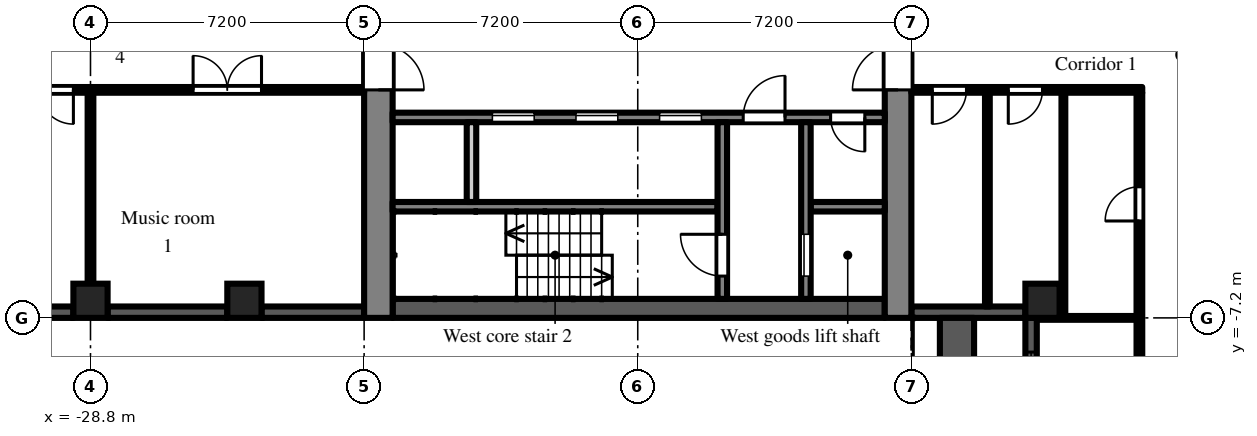
"""IFC4 building model, lengths in metres.
Left out: names, types, materials, properties, quantities, classifications, styles, units other than length and angle.
Written with IfcOpenShell. Run it as: python <this file> out.ifc"""

import sys

from ifc_helpers import new_model, si_unit, direction, frame, frame_2d, origin, origin_2d, place, context, subcontext, project, spatial, rectangle, extrude, element, fill, save


model = new_model("IFC4")
c1 = context("Model", 3, precision=1e-05, world=origin(), true_north=direction((0.0, 1.0)))
c2 = subcontext(c1, "Body", "Model", "MODEL_VIEW")
j1 = project(units=[si_unit("LENGTHUNIT", "METRE"), si_unit("PLANEANGLEUNIT", "RADIAN")], contexts=[c1])
p1 = place(None, origin())
s1 = spatial("IfcSite", under=j1, at=p1, CompositionType="ELEMENT")
p2 = place(p1, origin())
s2 = spatial("IfcBuilding", under=s1, at=p2, CompositionType="ELEMENT")
p3 = place(p2, frame((0.0, 0.0, 108.9)))
s3 = spatial("IfcBuildingStorey", under=s2, at=p3, CompositionType="ELEMENT", Elevation=108.9)
for number, where, z_axis, x_axis in (
    (1, (-28.8, -6.75, 0.0), (0.0, 0.0, 1.0), (1.0, 0.0, 0.0)),
    (2, (-24.75, -6.75, 0.0), (0.0, 0.0, 1.0), (1.0, 0.0, 0.0)),
    (3, (-3.75, -6.75, 0.0), (0.0, 0.0, 1.0), (1.0, 0.0, 0.0)),
):
    element("IfcColumn", number, at=place(p3, frame(where, z_axis=z_axis, x_axis=x_axis)), inside=s3, PredefinedType="COLUMN", context=c2, shape_type="SweptSolid", body=[
        extrude(rectangle(XDim=0.9, YDim=0.9, at=origin_2d()), origin(), (0.0, 0.0, 1.0), 3.0),
    ])
p4 = place(p3, frame((-35.55, -7.05, 0.0), z_axis=(0.0, 0.0, 1.0), x_axis=(1.0, 0.0, 0.0)))
e4 = element("IfcWall", 4, at=p4, inside=s3, PredefinedType="SOLIDWALL", context=c2, shape_type="SweptSolid", body=[
    extrude(rectangle(XDim=6.3, YDim=0.3, at=frame_2d((3.15, 0.0))), origin(), (0.0, 0.0, 1.0), 2.2),
])
p5 = place(p3, frame((-28.35, -7.05, 0.0), z_axis=(0.0, 0.0, 1.0), x_axis=(1.0, 0.0, 0.0)))
e5 = element("IfcWall", 5, at=p5, inside=s3, PredefinedType="SOLIDWALL", context=c2, shape_type="SweptSolid", body=[
    extrude(rectangle(XDim=3.15, YDim=0.3, at=frame_2d((1.575, 0.0))), origin(), (0.0, 0.0, 1.0), 2.2),
])
p6 = place(p3, frame((-24.3, -7.05, 0.0), z_axis=(0.0, 0.0, 1.0), x_axis=(1.0, 0.0, 0.0)))
e6 = element("IfcWall", 6, at=p6, inside=s3, PredefinedType="SOLIDWALL", context=c2, shape_type="SweptSolid", body=[
    extrude(rectangle(XDim=2.7, YDim=0.3, at=frame_2d((1.35, 0.0))), origin(), (0.0, 0.0, 1.0), 2.2),
])
p7 = place(p3, frame((-7.2, -7.05, 0.0), z_axis=(0.0, 0.0, 1.0), x_axis=(1.0, 0.0, 0.0)))
e7 = element("IfcWall", 7, at=p7, inside=s3, PredefinedType="SOLIDWALL", context=c2, shape_type="SweptSolid", body=[
    extrude(rectangle(XDim=3.0, YDim=0.3, at=frame_2d((1.5, 0.0))), origin(), (0.0, 0.0, 1.0), 2.55),
])
p8 = place(p3, frame((-4.05, -7.2, 0.0), z_axis=(0.0, 0.0, 1.0), x_axis=(0.0, -1.0, 0.0)))
e8 = element("IfcWall", 8, at=p8, inside=s3, PredefinedType="SOLIDWALL", context=c2, shape_type="SweptSolid", body=[
    extrude(rectangle(XDim=7.2, YDim=0.3, at=frame_2d((3.6, 0.0))), origin(), (0.0, 0.0, 1.0), 2.55),
])
p9 = place(p8, frame((3.0, 0.0, 0.0)))
e9 = element("IfcOpeningElement", 9, at=p9, cuts=e8, PredefinedType="OPENING", context=c2, shape_type="SweptSolid", body=[
    extrude(rectangle(XDim=1.2, YDim=2.05, at=frame_2d((0.6, 1.025))), frame((0.0, 0.16, 0.0), z_axis=(0.0, -1.0, 0.0), x_axis=(1.0, 0.0, 0.0)), (0.0, 0.0, 1.0), 0.32),
])
p10 = place(p8, frame((0.9, 0.0, 0.2)))
e10 = element("IfcOpeningElement", 10, at=p10, cuts=e8, PredefinedType="OPENING", context=c2, shape_type="SweptSolid", body=[
    extrude(rectangle(XDim=1.8, YDim=1.85, at=frame_2d((0.9, 0.925))), frame((0.0, 0.16, 0.0), z_axis=(0.0, -1.0, 0.0), x_axis=(1.0, 0.0, 0.0)), (0.0, 0.0, 1.0), 0.32),
])
p11 = place(p8, frame((4.5, 0.0, 0.2)))
e11 = element("IfcOpeningElement", 11, at=p11, cuts=e8, PredefinedType="OPENING", context=c2, shape_type="SweptSolid", body=[
    extrude(rectangle(XDim=1.8, YDim=1.85, at=frame_2d((0.9, 0.925))), frame((0.0, 0.16, 0.0), z_axis=(0.0, -1.0, 0.0), x_axis=(1.0, 0.0, 0.0)), (0.0, 0.0, 1.0), 0.32),
])
p12 = place(p3, frame((-6.0, -14.4, 0.0), z_axis=(0.0, 0.0, 1.0), x_axis=(0.0, 1.0, 0.0)))
e12 = element("IfcWall", 12, at=p12, inside=s3, PredefinedType="PARAPET", context=c2, shape_type="SweptSolid", body=[
    extrude(rectangle(XDim=7.2, YDim=0.9, at=frame_2d((3.6, 0.0))), origin(), (0.0, 0.0, 1.0), 0.8),
])
p13 = place(p3, frame((-7.55, -7.2, 0.0), z_axis=(0.0, 0.0, 1.0), x_axis=(0.0, 1.0, 0.0)))
e13 = element("IfcWall", 13, at=p13, inside=s3, PredefinedType="SHEAR", context=c2, shape_type="SweptSolid", body=[
    extrude(rectangle(XDim=14.4, YDim=0.7, at=frame_2d((7.2, 0.0))), origin(), (0.0, 0.0, 1.0), 2.55),
])
p14 = place(p13, frame((6.0, 0.0, 0.0)))
e14 = element("IfcOpeningElement", 14, at=p14, cuts=e13, PredefinedType="OPENING", context=c2, shape_type="SweptSolid", body=[
    extrude(rectangle(XDim=2.4, YDim=2.2, at=frame_2d((1.2, 1.1))), frame((0.0, 0.36, 0.0), z_axis=(0.0, -1.0, 0.0), x_axis=(1.0, 0.0, 0.0)), (0.0, 0.0, 1.0), 0.72),
])
p15 = place(p3, frame((-21.225, -7.2, 0.0), z_axis=(0.0, 0.0, 1.0), x_axis=(0.0, 1.0, 0.0)))
e15 = element("IfcWall", 15, at=p15, inside=s3, PredefinedType="SHEAR", context=c2, shape_type="SweptSolid", body=[
    extrude(rectangle(XDim=14.4, YDim=0.75, at=frame_2d((7.2, 0.0))), origin(), (0.0, 0.0, 1.0), 2.55),
])
p16 = place(p15, frame((6.0, 0.0, 0.0)))
e16 = element("IfcOpeningElement", 16, at=p16, cuts=e15, PredefinedType="OPENING", context=c2, shape_type="SweptSolid", body=[
    extrude(rectangle(XDim=2.4, YDim=2.2, at=frame_2d((1.2, 1.1))), frame((0.0, 0.385, 0.0), z_axis=(0.0, -1.0, 0.0), x_axis=(1.0, 0.0, 0.0)), (0.0, 0.0, 1.0), 0.77),
])
p17 = place(p3, frame((-7.9, -6.95, 0.0), z_axis=(0.0, 0.0, 1.0), x_axis=(-1.0, 0.0, 0.0)))
e17 = element("IfcWall", 17, at=p17, inside=s3, PredefinedType="SHEAR", context=c2, shape_type="SweptSolid", body=[
    extrude(rectangle(XDim=12.95, YDim=0.5, at=frame_2d((6.475, 0.0))), origin(), (0.0, 0.0, 1.0), 2.55),
])
p18 = place(p3, frame((-7.9, -1.925, 0.0), z_axis=(0.0, 0.0, 1.0), x_axis=(-1.0, 0.0, 0.0)))
e18 = element("IfcWall", 18, at=p18, inside=s3, PredefinedType="SHEAR", context=c2, shape_type="SweptSolid", body=[
    extrude(rectangle(XDim=12.95, YDim=0.25, at=frame_2d((6.475, 0.0))), origin(), (0.0, 0.0, 1.0), 2.55),
])
p19 = place(p18, frame((4.825, 0.0, 0.0)))
e19 = element("IfcOpeningElement", 19, at=p19, cuts=e18, PredefinedType="OPENING", context=c2, shape_type="SweptSolid", body=[
    extrude(rectangle(XDim=1.1, YDim=2.1, at=frame_2d((0.55, 1.05))), frame((0.0, 0.135, 0.0), z_axis=(0.0, -1.0, 0.0), x_axis=(1.0, 0.0, 0.0)), (0.0, 0.0, 1.0), 0.27),
])
p20 = place(p18, frame((7.025, 0.0, 0.0)))
e20 = element("IfcOpeningElement", 20, at=p20, cuts=e18, PredefinedType="OPENING", context=c2, shape_type="SweptSolid", body=[
    extrude(rectangle(XDim=1.1, YDim=2.1, at=frame_2d((0.55, 1.05))), frame((0.0, 0.135, 0.0), z_axis=(0.0, -1.0, 0.0), x_axis=(1.0, 0.0, 0.0)), (0.0, 0.0, 1.0), 0.27),
])
p21 = place(p18, frame((9.225, 0.0, 0.0)))
e21 = element("IfcOpeningElement", 21, at=p21, cuts=e18, PredefinedType="OPENING", context=c2, shape_type="SweptSolid", body=[
    extrude(rectangle(XDim=1.1, YDim=2.1, at=frame_2d((0.55, 1.05))), frame((0.0, 0.135, 0.0), z_axis=(0.0, -1.0, 0.0), x_axis=(1.0, 0.0, 0.0)), (0.0, 0.0, 1.0), 0.27),
])
p22 = place(p18, frame((0.525, 0.0, 0.0)))
e22 = element("IfcOpeningElement", 22, at=p22, cuts=e18, PredefinedType="OPENING", context=c2, shape_type="SweptSolid", body=[
    extrude(rectangle(XDim=0.9, YDim=2.1, at=frame_2d((0.45, 1.05))), frame((0.0, 0.135, 0.0), z_axis=(0.0, -1.0, 0.0), x_axis=(1.0, 0.0, 0.0)), (0.0, 0.0, 1.0), 0.27),
])
p23 = place(p18, frame((2.625, 0.0, 0.0)))
e23 = element("IfcOpeningElement", 23, at=p23, cuts=e18, PredefinedType="OPENING", context=c2, shape_type="SweptSolid", body=[
    extrude(rectangle(XDim=1.1, YDim=2.1, at=frame_2d((0.55, 1.05))), frame((0.0, 0.135, 0.0), z_axis=(0.0, -1.0, 0.0), x_axis=(1.0, 0.0, 0.0)), (0.0, 0.0, 1.0), 0.27),
])
p24 = place(p3, frame((-7.9, -4.275, 0.0), z_axis=(0.0, 0.0, 1.0), x_axis=(-1.0, 0.0, 0.0)))
e24 = element("IfcWall", 24, at=p24, inside=s3, PredefinedType="SHEAR", context=c2, shape_type="SweptSolid", body=[
    extrude(rectangle(XDim=1.95, YDim=0.25, at=frame_2d((0.975, 0.0))), origin(), (0.0, 0.0, 1.0), 2.55),
])
p25 = place(p3, frame((-12.3, -4.275, 0.0), z_axis=(0.0, 0.0, 1.0), x_axis=(-1.0, 0.0, 0.0)))
e25 = element("IfcWall", 25, at=p25, inside=s3, PredefinedType="SHEAR", context=c2, shape_type="SweptSolid", body=[
    extrude(rectangle(XDim=8.55, YDim=0.25, at=frame_2d((4.275, 0.0))), origin(), (0.0, 0.0, 1.0), 2.55),
])
p26 = place(p3, frame((-9.975, -2.05, 0.0), z_axis=(0.0, 0.0, 1.0), x_axis=(0.0, -1.0, 0.0)))
e26 = element("IfcWall", 26, at=p26, inside=s3, PredefinedType="SHEAR", context=c2, shape_type="SweptSolid", body=[
    extrude(rectangle(XDim=4.65, YDim=0.25, at=frame_2d((2.325, 0.0))), origin(), (0.0, 0.0, 1.0), 2.55),
])
p27 = place(p26, frame((2.95, 0.0, 0.0)))
e27 = element("IfcOpeningElement", 27, at=p27, cuts=e26, PredefinedType="OPENING", context=c2, shape_type="SweptSolid", body=[
    extrude(rectangle(XDim=1.1, YDim=2.1, at=frame_2d((0.55, 1.05))), frame((0.0, 0.135, 0.0), z_axis=(0.0, -1.0, 0.0), x_axis=(1.0, 0.0, 0.0)), (0.0, 0.0, 1.0), 0.27),
])
p28 = place(p3, frame((-12.175, -2.05, 0.0), z_axis=(0.0, 0.0, 1.0), x_axis=(0.0, -1.0, 0.0)))
e28 = element("IfcWall", 28, at=p28, inside=s3, PredefinedType="SHEAR", context=c2, shape_type="SweptSolid", body=[
    extrude(rectangle(XDim=4.65, YDim=0.25, at=frame_2d((2.325, 0.0))), origin(), (0.0, 0.0, 1.0), 2.55),
])
p29 = place(p28, frame((2.95, 0.0, 0.0)))
e29 = element("IfcOpeningElement", 29, at=p29, cuts=e28, PredefinedType="OPENING", context=c2, shape_type="SweptSolid", body=[
    extrude(rectangle(XDim=1.1, YDim=2.1, at=frame_2d((0.55, 1.05))), frame((0.0, 0.135, 0.0), z_axis=(0.0, -1.0, 0.0), x_axis=(1.0, 0.0, 0.0)), (0.0, 0.0, 1.0), 0.27),
])
p30 = place(p3, frame((-18.775, -2.05, 0.0), z_axis=(0.0, 0.0, 1.0), x_axis=(0.0, -1.0, 0.0)))
e30 = element("IfcWall", 30, at=p30, inside=s3, PredefinedType="PARTITIONING", context=c2, shape_type="SweptSolid", body=[
    extrude(rectangle(XDim=2.1, YDim=0.25, at=frame_2d((1.05, 0.0))), origin(), (0.0, 0.0, 1.0), 2.55),
])
p31 = place(p3, frame((-36.5, -1.2, 0.0), z_axis=(0.0, 0.0, 1.0), x_axis=(1.0, 0.0, 0.0)))
e31 = element("IfcWall", 31, at=p31, inside=s3, PredefinedType="PARTITIONING", context=c2, shape_type="SweptSolid", body=[
    extrude(rectangle(XDim=14.9, YDim=0.15, at=frame_2d((7.45, 0.0))), origin(), (0.0, 0.0, 1.0), 2.55),
])
p32 = place(p31, frame((10.4, 0.0, 0.0)))
e32 = element("IfcOpeningElement", 32, at=p32, cuts=e31, PredefinedType="OPENING", context=c2, shape_type="SweptSolid", body=[
    extrude(rectangle(XDim=1.8, YDim=2.1, at=frame_2d((0.9, 1.05))), frame((0.0, 0.085, 0.0), z_axis=(0.0, -1.0, 0.0), x_axis=(1.0, 0.0, 0.0)), (0.0, 0.0, 1.0), 0.17),
])
p33 = place(p31, frame((6.35, 0.0, 0.0)))
e33 = element("IfcOpeningElement", 33, at=p33, cuts=e31, PredefinedType="OPENING", context=c2, shape_type="SweptSolid", body=[
    extrude(rectangle(XDim=0.9, YDim=2.1, at=frame_2d((0.45, 1.05))), frame((0.0, 0.085, 0.0), z_axis=(0.0, -1.0, 0.0), x_axis=(1.0, 0.0, 0.0)), (0.0, 0.0, 1.0), 0.17),
])
p34 = place(p31, frame((4.55, 0.0, 0.0)))
e34 = element("IfcOpeningElement", 34, at=p34, cuts=e31, PredefinedType="OPENING", context=c2, shape_type="SweptSolid", body=[
    extrude(rectangle(XDim=0.9, YDim=2.1, at=frame_2d((0.45, 1.05))), frame((0.0, 0.085, 0.0), z_axis=(0.0, -1.0, 0.0), x_axis=(1.0, 0.0, 0.0)), (0.0, 0.0, 1.0), 0.17),
])
p35 = place(p31, frame((1.15, 0.0, 0.0)))
e35 = element("IfcOpeningElement", 35, at=p35, cuts=e31, PredefinedType="OPENING", context=c2, shape_type="SweptSolid", body=[
    extrude(rectangle(XDim=1.8, YDim=2.1, at=frame_2d((0.9, 1.05))), frame((0.0, 0.085, 0.0), z_axis=(0.0, -1.0, 0.0), x_axis=(1.0, 0.0, 0.0)), (0.0, 0.0, 1.0), 0.17),
])
p36 = place(p3, frame((-28.8, -6.9, 0.0), z_axis=(0.0, 0.0, 1.0), x_axis=(0.0, 1.0, 0.0)))
e36 = element("IfcWall", 36, at=p36, inside=s3, PredefinedType="PARTITIONING", context=c2, shape_type="SweptSolid", body=[
    extrude(rectangle(XDim=5.625, YDim=0.15, at=frame_2d((2.812, 0.0))), origin(), (0.0, 0.0, 1.0), 2.55),
])
p37 = place(p3, frame((-7.2, -1.2, 0.0), z_axis=(0.0, 0.0, 1.0), x_axis=(1.0, 0.0, 0.0)))
e37 = element("IfcWall", 37, at=p37, inside=s3, PredefinedType="PARTITIONING", context=c2, shape_type="SweptSolid", body=[
    extrude(rectangle(XDim=6.075, YDim=0.15, at=frame_2d((3.038, 0.0))), origin(), (0.0, 0.0, 1.0), 2.55),
])
p38 = place(p37, frame((2.55, 0.0, 0.0)))
e38 = element("IfcOpeningElement", 38, at=p38, cuts=e37, PredefinedType="OPENING", context=c2, shape_type="SweptSolid", body=[
    extrude(rectangle(XDim=0.9, YDim=2.1, at=frame_2d((0.45, 1.05))), frame((0.0, 0.085, 0.0), z_axis=(0.0, -1.0, 0.0), x_axis=(1.0, 0.0, 0.0)), (0.0, 0.0, 1.0), 0.17),
])
p39 = place(p37, frame((0.55, 0.0, 0.0)))
e39 = element("IfcOpeningElement", 39, at=p39, cuts=e37, PredefinedType="OPENING", context=c2, shape_type="SweptSolid", body=[
    extrude(rectangle(XDim=0.9, YDim=2.1, at=frame_2d((0.45, 1.05))), frame((0.0, 0.085, 0.0), z_axis=(0.0, -1.0, 0.0), x_axis=(1.0, 0.0, 0.0)), (0.0, 0.0, 1.0), 0.17),
])
p40 = place(p3, frame((-5.2, -6.9, 0.0), z_axis=(0.0, 0.0, 1.0), x_axis=(0.0, 1.0, 0.0)))
e40 = element("IfcWall", 40, at=p40, inside=s3, PredefinedType="PARTITIONING", context=c2, shape_type="SweptSolid", body=[
    extrude(rectangle(XDim=5.625, YDim=0.125, at=frame_2d((2.812, 0.0))), origin(), (0.0, 0.0, 1.0), 2.55),
])
p41 = place(p3, frame((-3.9, -7.2, 0.0), z_axis=(0.0, 0.0, 1.0), x_axis=(1.0, 0.0, 0.0)))
e41 = element("IfcWall", 41, at=p41, inside=s3, PredefinedType="PARTITIONING", context=c2, shape_type="SweptSolid", body=[
    extrude(rectangle(XDim=2.625, YDim=0.1, at=frame_2d((1.312, 0.0))), origin(), (0.0, 0.0, 1.0), 2.55),
])
p42 = place(p3, frame((-3.2, -7.15, 0.0), z_axis=(0.0, 0.0, 1.0), x_axis=(0.0, 1.0, 0.0)))
e42 = element("IfcWall", 42, at=p42, inside=s3, PredefinedType="PARTITIONING", context=c2, shape_type="SweptSolid", body=[
    extrude(rectangle(XDim=5.875, YDim=0.1, at=frame_2d((2.938, 0.0))), origin(), (0.0, 0.0, 1.0), 2.55),
])
p43 = place(p3, frame((-1.2, -36.5, 0.0), z_axis=(0.0, 0.0, 1.0), x_axis=(0.0, 1.0, 0.0)))
e43 = element("IfcWall", 43, at=p43, inside=s3, PredefinedType="PARTITIONING", context=c2, shape_type="SweptSolid", body=[
    extrude(rectangle(XDim=35.225, YDim=0.15, at=frame_2d((17.613, 0.0))), origin(), (0.0, 0.0, 1.0), 2.55),
])
p44 = place(p43, frame((31.85, 0.0, 0.0)))
e44 = element("IfcOpeningElement", 44, at=p44, cuts=e43, PredefinedType="OPENING", context=c2, shape_type="SweptSolid", body=[
    extrude(rectangle(XDim=0.9, YDim=2.1, at=frame_2d((0.45, 1.05))), frame((0.0, 0.085, 0.0), z_axis=(0.0, -1.0, 0.0), x_axis=(1.0, 0.0, 0.0)), (0.0, 0.0, 1.0), 0.17),
])
p45 = place(p43, frame((27.05, 0.0, 0.0)))
e45 = element("IfcOpeningElement", 45, at=p45, cuts=e43, PredefinedType="OPENING", context=c2, shape_type="SweptSolid", body=[
    extrude(rectangle(XDim=0.9, YDim=2.1, at=frame_2d((0.45, 1.05))), frame((0.0, 0.085, 0.0), z_axis=(0.0, -1.0, 0.0), x_axis=(1.0, 0.0, 0.0)), (0.0, 0.0, 1.0), 0.17),
])
p46 = place(p43, frame((20.75, 0.0, 0.0)))
e46 = element("IfcOpeningElement", 46, at=p46, cuts=e43, PredefinedType="OPENING", context=c2, shape_type="SweptSolid", body=[
    extrude(rectangle(XDim=0.9, YDim=2.1, at=frame_2d((0.45, 1.05))), frame((0.0, 0.085, 0.0), z_axis=(0.0, -1.0, 0.0), x_axis=(1.0, 0.0, 0.0)), (0.0, 0.0, 1.0), 0.17),
])
p47 = place(p43, frame((18.95, 0.0, 0.0)))
e47 = element("IfcOpeningElement", 47, at=p47, cuts=e43, PredefinedType="OPENING", context=c2, shape_type="SweptSolid", body=[
    extrude(rectangle(XDim=0.9, YDim=2.1, at=frame_2d((0.45, 1.05))), frame((0.0, 0.085, 0.0), z_axis=(0.0, -1.0, 0.0), x_axis=(1.0, 0.0, 0.0)), (0.0, 0.0, 1.0), 0.17),
])
p48 = place(p43, frame((1.55, 0.0, 0.0)))
e48 = element("IfcOpeningElement", 48, at=p48, cuts=e43, PredefinedType="OPENING", context=c2, shape_type="SweptSolid", body=[
    extrude(rectangle(XDim=1.0, YDim=2.1, at=frame_2d((0.5, 1.05))), frame((0.0, 0.085, 0.0), z_axis=(0.0, -1.0, 0.0), x_axis=(1.0, 0.0, 0.0)), (0.0, 0.0, 1.0), 0.17),
])
p49 = place(p10, origin())
e49 = element("IfcWindow", 49, at=p49, inside=s3, PartitioningType="SINGLE_PANEL", PredefinedType="WINDOW", context=c2, shape_type="SweptSolid", body=[
    extrude(rectangle(XDim=1.8, YDim=1.85, at=frame_2d((0.9, 0.925))), frame((0.0, 0.03, 0.0), z_axis=(0.0, -1.0, 0.0), x_axis=(1.0, 0.0, 0.0)), (0.0, 0.0, 1.0), 0.06),
])
fill(e10, e49)
p50 = place(p19, origin())
e50 = element("IfcDoor", 50, at=p50, inside=s3, OperationType="SLIDING_TO_LEFT", PredefinedType="DOOR", context=c2, shape_type="SweptSolid", body=[
    extrude(rectangle(XDim=1.1, YDim=2.1, at=frame_2d((0.55, 1.05))), frame((0.0, 0.025, 0.0), z_axis=(0.0, -1.0, 0.0), x_axis=(1.0, 0.0, 0.0)), (0.0, 0.0, 1.0), 0.05),
])
fill(e19, e50)
p51 = place(p20, origin())
e51 = element("IfcDoor", 51, at=p51, inside=s3, OperationType="SLIDING_TO_LEFT", PredefinedType="DOOR", context=c2, shape_type="SweptSolid", body=[
    extrude(rectangle(XDim=1.1, YDim=2.1, at=frame_2d((0.55, 1.05))), frame((0.0, 0.025, 0.0), z_axis=(0.0, -1.0, 0.0), x_axis=(1.0, 0.0, 0.0)), (0.0, 0.0, 1.0), 0.05),
])
fill(e20, e51)
p52 = place(p21, origin())
e52 = element("IfcDoor", 52, at=p52, inside=s3, OperationType="SLIDING_TO_LEFT", PredefinedType="DOOR", context=c2, shape_type="SweptSolid", body=[
    extrude(rectangle(XDim=1.1, YDim=2.1, at=frame_2d((0.55, 1.05))), frame((0.0, 0.025, 0.0), z_axis=(0.0, -1.0, 0.0), x_axis=(1.0, 0.0, 0.0)), (0.0, 0.0, 1.0), 0.05),
])
fill(e21, e52)
p53 = place(p27, origin())
e53 = element("IfcDoor", 53, at=p53, inside=s3, OperationType="SLIDING_TO_LEFT", PredefinedType="DOOR", context=c2, shape_type="SweptSolid", body=[
    extrude(rectangle(XDim=1.1, YDim=2.1, at=frame_2d((0.55, 1.05))), frame((0.0, 0.025, 0.0), z_axis=(0.0, -1.0, 0.0), x_axis=(1.0, 0.0, 0.0)), (0.0, 0.0, 1.0), 0.05),
])
fill(e27, e53)
p54 = place(p29, frame((1.1, 0.0, 0.0), z_axis=(0.0, 0.0, 1.0), x_axis=(-1.0, 0.0, 0.0)))
e54 = element("IfcDoor", 54, at=p54, inside=s3, OperationType="SINGLE_SWING_RIGHT", PredefinedType="DOOR", context=c2, shape_type="SweptSolid", body=[
    extrude(rectangle(XDim=1.1, YDim=2.1, at=frame_2d((0.55, 1.05))), frame((0.0, 0.025, 0.0), z_axis=(0.0, -1.0, 0.0), x_axis=(1.0, 0.0, 0.0)), (0.0, 0.0, 1.0), 0.05),
])
fill(e29, e54)
p55 = place(p22, origin())
e55 = element("IfcDoor", 55, at=p55, inside=s3, OperationType="SINGLE_SWING_LEFT", PredefinedType="DOOR", context=c2, shape_type="SweptSolid", body=[
    extrude(rectangle(XDim=0.9, YDim=2.1, at=frame_2d((0.45, 1.05))), frame((0.0, 0.025, 0.0), z_axis=(0.0, -1.0, 0.0), x_axis=(1.0, 0.0, 0.0)), (0.0, 0.0, 1.0), 0.05),
])
fill(e22, e55)
p56 = place(p23, frame((1.1, 0.0, 0.0), z_axis=(0.0, 0.0, 1.0), x_axis=(-1.0, 0.0, 0.0)))
e56 = element("IfcDoor", 56, at=p56, inside=s3, OperationType="SINGLE_SWING_RIGHT", PredefinedType="DOOR", context=c2, shape_type="SweptSolid", body=[
    extrude(rectangle(XDim=1.1, YDim=2.1, at=frame_2d((0.55, 1.05))), frame((0.0, 0.025, 0.0), z_axis=(0.0, -1.0, 0.0), x_axis=(1.0, 0.0, 0.0)), (0.0, 0.0, 1.0), 0.05),
])
fill(e23, e56)
p57 = place(p14, origin())
e57 = element("IfcDoor", 57, at=p57, inside=s3, OperationType="DOUBLE_DOOR_DOUBLE_SWING", PredefinedType="DOOR", context=c2, shape_type="SweptSolid", body=[
    extrude(rectangle(XDim=2.4, YDim=2.2, at=frame_2d((1.2, 1.1))), frame((0.0, 0.025, 0.0), z_axis=(0.0, -1.0, 0.0), x_axis=(1.0, 0.0, 0.0)), (0.0, 0.0, 1.0), 0.05),
])
fill(e14, e57)
p58 = place(p16, frame((2.4, 0.0, 0.0), z_axis=(0.0, 0.0, 1.0), x_axis=(-1.0, 0.0, 0.0)))
e58 = element("IfcDoor", 58, at=p58, inside=s3, OperationType="DOUBLE_DOOR_DOUBLE_SWING", PredefinedType="DOOR", context=c2, shape_type="SweptSolid", body=[
    extrude(rectangle(XDim=2.4, YDim=2.2, at=frame_2d((1.2, 1.1))), frame((0.0, 0.025, 0.0), z_axis=(0.0, -1.0, 0.0), x_axis=(1.0, 0.0, 0.0)), (0.0, 0.0, 1.0), 0.05),
])
fill(e16, e58)
p59 = place(p44, origin())
e59 = element("IfcDoor", 59, at=p59, inside=s3, OperationType="SINGLE_SWING_LEFT", PredefinedType="DOOR", context=c2, shape_type="SweptSolid", body=[
    extrude(rectangle(XDim=0.9, YDim=2.1, at=frame_2d((0.45, 1.05))), frame((0.0, 0.025, 0.0), z_axis=(0.0, -1.0, 0.0), x_axis=(1.0, 0.0, 0.0)), (0.0, 0.0, 1.0), 0.05),
])
fill(e44, e59)
p60 = place(p38, frame((0.9, 0.0, 0.0), z_axis=(0.0, 0.0, 1.0), x_axis=(-1.0, 0.0, 0.0)))
e60 = element("IfcDoor", 60, at=p60, inside=s3, OperationType="SINGLE_SWING_RIGHT", PredefinedType="DOOR", context=c2, shape_type="SweptSolid", body=[
    extrude(rectangle(XDim=0.9, YDim=2.1, at=frame_2d((0.45, 1.05))), frame((0.0, 0.025, 0.0), z_axis=(0.0, -1.0, 0.0), x_axis=(1.0, 0.0, 0.0)), (0.0, 0.0, 1.0), 0.05),
])
fill(e38, e60)
p61 = place(p39, frame((0.9, 0.0, 0.0), z_axis=(0.0, 0.0, 1.0), x_axis=(-1.0, 0.0, 0.0)))
e61 = element("IfcDoor", 61, at=p61, inside=s3, OperationType="SINGLE_SWING_RIGHT", PredefinedType="DOOR", context=c2, shape_type="SweptSolid", body=[
    extrude(rectangle(XDim=0.9, YDim=2.1, at=frame_2d((0.45, 1.05))), frame((0.0, 0.025, 0.0), z_axis=(0.0, -1.0, 0.0), x_axis=(1.0, 0.0, 0.0)), (0.0, 0.0, 1.0), 0.05),
])
fill(e39, e61)
p62 = place(p32, origin())
e62 = element("IfcDoor", 62, at=p62, inside=s3, OperationType="DOUBLE_DOOR_DOUBLE_SWING", PredefinedType="DOOR", context=c2, shape_type="SweptSolid", body=[
    extrude(rectangle(XDim=1.8, YDim=2.1, at=frame_2d((0.9, 1.05))), frame((0.0, 0.025, 0.0), z_axis=(0.0, -1.0, 0.0), x_axis=(1.0, 0.0, 0.0)), (0.0, 0.0, 1.0), 0.05),
])
fill(e32, e62)
p63 = place(p33, frame((0.9, 0.0, 0.0), z_axis=(0.0, 0.0, 1.0), x_axis=(-1.0, 0.0, 0.0)))
e63 = element("IfcDoor", 63, at=p63, inside=s3, OperationType="SINGLE_SWING_LEFT", PredefinedType="DOOR", context=c2, shape_type="SweptSolid", body=[
    extrude(rectangle(XDim=0.9, YDim=2.1, at=frame_2d((0.45, 1.05))), frame((0.0, 0.025, 0.0), z_axis=(0.0, -1.0, 0.0), x_axis=(1.0, 0.0, 0.0)), (0.0, 0.0, 1.0), 0.05),
])
fill(e33, e63)
save(model, sys.argv[1])
